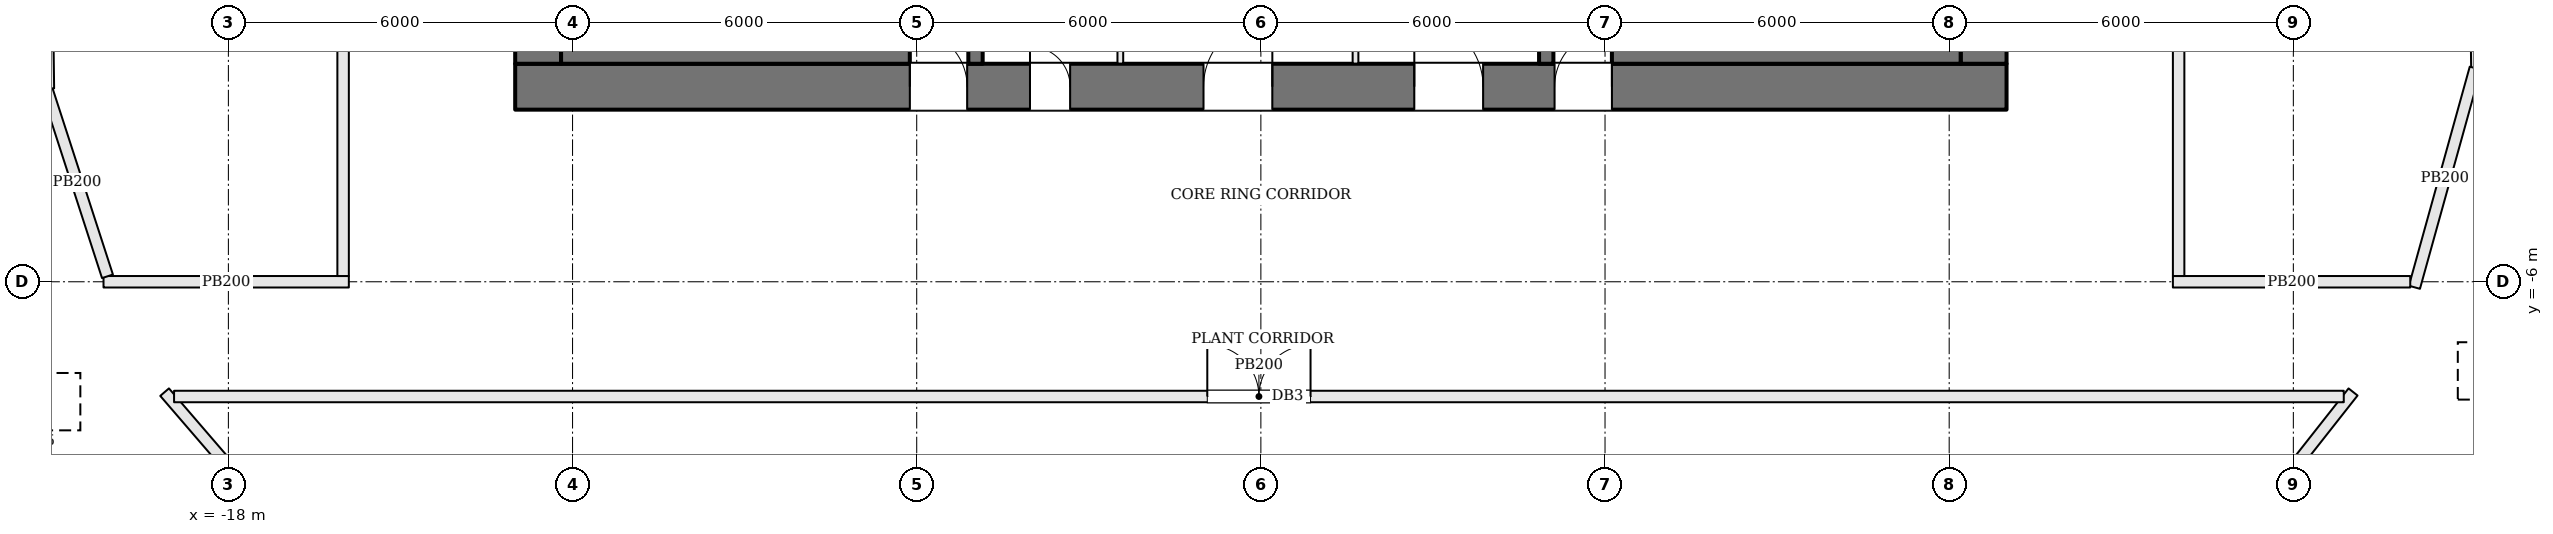
"""IFC4 building model, lengths in metres.
Left out: names, types, materials, properties, quantities, classifications, styles, units other than length and angle.
Written with IfcOpenShell. Run it as: python <this file> out.ifc"""

import sys

from ifc_helpers import new_model, si_unit, direction, frame, frame_2d, origin, origin_2d, place, context, subcontext, project, spatial, rectangle, extrude, element, fill, save


model = new_model("IFC4")
c1 = context("Model", 3, precision=1e-05, world=origin(), true_north=direction((0.0, 1.0)))
c2 = subcontext(c1, "Body", "Model", "MODEL_VIEW")
j1 = project(units=[si_unit("LENGTHUNIT", "METRE"), si_unit("PLANEANGLEUNIT", "RADIAN")], contexts=[c1])
p1 = place(None, origin())
s1 = spatial("IfcSite", under=j1, at=p1, CompositionType="ELEMENT")
p2 = place(p1, origin())
s2 = spatial("IfcBuilding", under=s1, at=p2, CompositionType="ELEMENT")
p3 = place(p2, frame((0.0, 0.0, 264.3)))
s3 = spatial("IfcBuildingStorey", under=s2, at=p3, CompositionType="ELEMENT", Elevation=264.3)
p4 = place(p3, frame((-13.0, -2.6, 0.0), z_axis=(0.0, 0.0, 1.0), x_axis=(1.0, 0.0, 0.0)))
e1 = element("IfcWall", 1, at=p4, inside=s3, PredefinedType="SHEAR", context=c2, shape_type="SweptSolid", body=[
    extrude(rectangle(XDim=26.0, YDim=0.8, at=frame_2d((13.0, 0.0))), origin(), (0.0, 0.0, 1.0), 4.5),
])
p5 = place(p4, frame((8.975, 0.0, 0.0)))
e2 = element("IfcOpeningElement", 2, at=p5, cuts=e1, PredefinedType="OPENING", context=c2, shape_type="SweptSolid", body=[
    extrude(rectangle(XDim=0.7, YDim=2.1, at=frame_2d((0.35, 1.05))), frame((0.0, 0.41, 0.0), z_axis=(0.0, -1.0, 0.0), x_axis=(1.0, 0.0, 0.0)), (0.0, 0.0, 1.0), 0.82),
])
p6 = place(p4, frame((12.0, 0.0, 0.0)))
e3 = element("IfcOpeningElement", 3, at=p6, cuts=e1, PredefinedType="OPENING", context=c2, shape_type="SweptSolid", body=[
    extrude(rectangle(XDim=1.2, YDim=2.1, at=frame_2d((0.6, 1.05))), frame((0.0, 0.41, 0.0), z_axis=(0.0, -1.0, 0.0), x_axis=(1.0, 0.0, 0.0)), (0.0, 0.0, 1.0), 0.82),
])
p7 = place(p4, frame((15.675, 0.0, 0.0)))
e4 = element("IfcOpeningElement", 4, at=p7, cuts=e1, PredefinedType="OPENING", context=c2, shape_type="SweptSolid", body=[
    extrude(rectangle(XDim=1.2, YDim=2.1, at=frame_2d((0.6, 1.05))), frame((0.0, 0.41, 0.0), z_axis=(0.0, -1.0, 0.0), x_axis=(1.0, 0.0, 0.0)), (0.0, 0.0, 1.0), 0.82),
])
p8 = place(p4, frame((6.88, 0.0, 0.0)))
e5 = element("IfcOpeningElement", 5, at=p8, cuts=e1, PredefinedType="OPENING", context=c2, shape_type="SweptSolid", body=[
    extrude(rectangle(XDim=1.0, YDim=2.1, at=frame_2d((0.5, 1.05))), frame((0.0, 0.41, 0.0), z_axis=(0.0, -1.0, 0.0), x_axis=(1.0, 0.0, 0.0)), (0.0, 0.0, 1.0), 0.82),
])
p9 = place(p4, frame((18.12, 0.0, 0.0)))
e6 = element("IfcOpeningElement", 6, at=p9, cuts=e1, PredefinedType="OPENING", context=c2, shape_type="SweptSolid", body=[
    extrude(rectangle(XDim=1.0, YDim=2.1, at=frame_2d((0.5, 1.05))), frame((0.0, 0.41, 0.0), z_axis=(0.0, -1.0, 0.0), x_axis=(1.0, 0.0, 0.0)), (0.0, 0.0, 1.0), 0.82),
])
p10 = place(p3, frame((12.6, -2.2, 0.0), z_axis=(0.0, 0.0, 1.0), x_axis=(0.0, 1.0, 0.0)))
e7 = element("IfcWall", 7, at=p10, inside=s3, PredefinedType="SHEAR", context=c2, shape_type="SweptSolid", body=[
    extrude(rectangle(XDim=13.4, YDim=0.8, at=frame_2d((6.7, 0.0))), origin(), (0.0, 0.0, 1.0), 4.5),
])
p11 = place(p10, frame((7.4, 0.0, 0.0)))
e8 = element("IfcOpeningElement", 8, at=p11, cuts=e7, PredefinedType="OPENING", context=c2, shape_type="SweptSolid", body=[
    extrude(rectangle(XDim=1.8, YDim=2.1, at=frame_2d((0.9, 1.05))), frame((0.0, 0.41, 0.0), z_axis=(0.0, -1.0, 0.0), x_axis=(1.0, 0.0, 0.0)), (0.0, 0.0, 1.0), 0.82),
])
p12 = place(p3, frame((-12.6, -2.2, 0.0), z_axis=(0.0, 0.0, 1.0), x_axis=(0.0, 1.0, 0.0)))
e9 = element("IfcWall", 9, at=p12, inside=s3, PredefinedType="SHEAR", context=c2, shape_type="SweptSolid", body=[
    extrude(rectangle(XDim=13.4, YDim=0.8, at=frame_2d((6.7, 0.0))), origin(), (0.0, 0.0, 1.0), 4.5),
])
p13 = place(p12, frame((4.2, 0.0, 0.0)))
e10 = element("IfcOpeningElement", 10, at=p13, cuts=e9, PredefinedType="OPENING", context=c2, shape_type="SweptSolid", body=[
    extrude(rectangle(XDim=1.8, YDim=2.1, at=frame_2d((0.9, 1.05))), frame((0.0, 0.41, 0.0), z_axis=(0.0, -1.0, 0.0), x_axis=(1.0, 0.0, 0.0)), (0.0, 0.0, 1.0), 0.82),
])
p14 = place(p3, frame((-22.879, -8.787, -0.585), z_axis=(0.391333642687, 0.151718841645, 0.907655977335), x_axis=(-0.361480683506, 0.932379598367, 0.0)))
e11 = element("IfcColumn", 11, at=p14, inside=s3, PredefinedType="COLUMN", context=c2, shape_type="SweptSolid", body=[
    extrude(rectangle(XDim=1.0, YDim=1.0, at=origin_2d()), origin(), (0.0, 0.0, 1.0), 4.594),
])
p15 = place(p3, frame((23.185, -8.21, -0.585), z_axis=(-0.395577824141, 0.142730980726, 0.907273967547), x_axis=(-0.339399243932, -0.940642415171, 0.0)))
e12 = element("IfcColumn", 12, at=p15, inside=s3, PredefinedType="COLUMN", context=c2, shape_type="SweptSolid", body=[
    extrude(rectangle(XDim=1.0, YDim=1.0, at=origin_2d()), origin(), (0.0, 0.0, 1.0), 4.596),
])
p16 = place(p3, frame((-4.975, -2.2, 0.0), z_axis=(0.0, 0.0, 1.0), x_axis=(0.0, 1.0, 0.0)))
e13 = element("IfcWall", 13, at=p16, inside=s3, PredefinedType="SOLIDWALL", context=c2, shape_type="SweptSolid", body=[
    extrude(rectangle(XDim=13.4, YDim=0.25, at=frame_2d((6.7, 0.0))), origin(), (0.0, 0.0, 1.0), 4.3),
])
p17 = place(p16, frame((5.25, 0.0, 0.0)))
e14 = element("IfcOpeningElement", 14, at=p17, cuts=e13, PredefinedType="OPENING", context=c2, shape_type="SweptSolid", body=[
    extrude(rectangle(XDim=1.2, YDim=2.1, at=frame_2d((0.6, 1.05))), frame((0.0, 0.135, 0.0), z_axis=(0.0, -1.0, 0.0), x_axis=(1.0, 0.0, 0.0)), (0.0, 0.0, 1.0), 0.27),
])
p18 = place(p3, frame((4.975, 11.2, 0.0), z_axis=(0.0, 0.0, 1.0), x_axis=(0.0, -1.0, 0.0)))
e15 = element("IfcWall", 15, at=p18, inside=s3, PredefinedType="SOLIDWALL", context=c2, shape_type="SweptSolid", body=[
    extrude(rectangle(XDim=13.4, YDim=0.25, at=frame_2d((6.7, 0.0))), origin(), (0.0, 0.0, 1.0), 4.3),
])
p19 = place(p18, frame((5.25, 0.0, 0.0)))
e16 = element("IfcOpeningElement", 16, at=p19, cuts=e15, PredefinedType="OPENING", context=c2, shape_type="SweptSolid", body=[
    extrude(rectangle(XDim=1.2, YDim=2.1, at=frame_2d((0.6, 1.05))), frame((0.0, 0.135, 0.0), z_axis=(0.0, -1.0, 0.0), x_axis=(1.0, 0.0, 0.0)), (0.0, 0.0, 1.0), 0.27),
])
for number, where, z_axis, x_axis in (
    (17, (-12.2, -1.9, 0.0), (0.0, 0.0, 1.0), (1.0, 0.0, 0.0)),
    (18, (12.2, -1.9, 0.0), (0.0, 0.0, 1.0), (-1.0, 0.0, 0.0)),
):
    element("IfcWall", number, at=place(p3, frame(where, z_axis=z_axis, x_axis=x_axis)), inside=s3, PredefinedType="SOLIDWALL", context=c2, shape_type="SweptSolid", body=[
        extrude(rectangle(XDim=6.08, YDim=0.6, at=frame_2d((3.04, 0.0))), origin(), (0.0, 0.0, 1.0), 4.3),
    ])
for number, where, z_axis, x_axis in (
    (19, (-2.45, -2.2, 0.0), (0.0, 0.0, 1.0), (0.0, 1.0, 0.0)),
    (20, (1.65, -2.2, 0.0), (0.0, 0.0, 1.0), (0.0, 1.0, 0.0)),
):
    element("IfcWall", number, at=place(p3, frame(where, z_axis=z_axis, x_axis=x_axis)), inside=s3, PredefinedType="PARTITIONING", context=c2, shape_type="SweptSolid", body=[
        extrude(rectangle(XDim=2.6, YDim=0.1, at=frame_2d((1.3, 0.0))), origin(), (0.0, 0.0, 1.0), 4.3),
    ])
p20 = place(p3, frame((19.041, -7.921, 0.0), z_axis=(0.0, 0.0, 1.0), x_axis=(-0.618817980567, -0.785534408493, 0.0)))
e21 = element("IfcWall", 21, at=p20, inside=s3, PredefinedType="PARTITIONING", context=c2, shape_type="SweptSolid", body=[
    extrude(rectangle(XDim=3.45, YDim=0.2, at=frame_2d((1.725, 0.0))), origin(), (0.0, 0.0, 1.0), 4.3),
])
p21 = place(p3, frame((-16.614, -10.824, 0.0), z_axis=(0.0, 0.0, 1.0), x_axis=(-0.652659458067, 0.757651391998, 0.0)))
e22 = element("IfcWall", 22, at=p21, inside=s3, PredefinedType="PARTITIONING", context=c2, shape_type="SweptSolid", body=[
    extrude(rectangle(XDim=3.827, YDim=0.2, at=frame_2d((1.914, 0.0))), origin(), (0.0, 0.0, 1.0), 4.3),
])
p22 = place(p3, frame((-18.947, -8.0, 0.0), z_axis=(0.0, 0.0, 1.0), x_axis=(1.0, 0.0, 0.0)))
e23 = element("IfcWall", 23, at=p22, inside=s3, PredefinedType="PARTITIONING", context=c2, shape_type="SweptSolid", body=[
    extrude(rectangle(XDim=37.826, YDim=0.2, at=frame_2d((18.913, 0.0))), origin(), (0.0, 0.0, 1.0), 4.3),
])
p23 = place(p22, frame((18.013, 0.0, 0.0)))
e24 = element("IfcOpeningElement", 24, at=p23, cuts=e23, PredefinedType="OPENING", context=c2, shape_type="SweptSolid", body=[
    extrude(rectangle(XDim=1.8, YDim=2.1, at=frame_2d((0.9, 1.05))), frame((0.0, 0.11, 0.0), z_axis=(0.0, -1.0, 0.0), x_axis=(1.0, 0.0, 0.0)), (0.0, 0.0, 1.0), 0.22),
])
p24 = place(p3, frame((-15.9, -6.0, 0.0), z_axis=(0.0, 0.0, 1.0), x_axis=(-1.0, 0.0, 0.0)))
e25 = element("IfcWall", 25, at=p24, inside=s3, PredefinedType="PARTITIONING", context=c2, shape_type="SweptSolid", body=[
    extrude(rectangle(XDim=4.277, YDim=0.2, at=frame_2d((2.139, 0.0))), origin(), (0.0, 0.0, 1.0), 4.3),
])
p25 = place(p3, frame((-20.108, -5.905, 0.0), z_axis=(0.0, 0.0, 1.0), x_axis=(-0.308376170844, 0.951264493848, 0.0)))
e26 = element("IfcWall", 26, at=p25, inside=s3, PredefinedType="PARTITIONING", context=c2, shape_type="SweptSolid", body=[
    extrude(rectangle(XDim=3.438, YDim=0.2, at=frame_2d((1.719, 0.0))), origin(), (0.0, 0.0, 1.0), 4.3),
])
p26 = place(p3, frame((-21.138, -2.63, 0.0), z_axis=(0.0, 0.0, 1.0), x_axis=(-0.012626385888, 0.999920284012, 0.0)))
e27 = element("IfcWall", 27, at=p26, inside=s3, PredefinedType="PARTITIONING", context=c2, shape_type="SweptSolid", body=[
    extrude(rectangle(XDim=4.911, YDim=0.2, at=frame_2d((2.456, 0.0))), origin(), (0.0, 0.0, 1.0), 4.3),
])
p27 = place(p3, frame((-16.0, 11.053, 0.0), z_axis=(0.0, 0.0, 1.0), x_axis=(0.0, -1.0, 0.0)))
e28 = element("IfcWall", 28, at=p27, inside=s3, PredefinedType="PARTITIONING", context=c2, shape_type="SweptSolid", body=[
    extrude(rectangle(XDim=16.953, YDim=0.2, at=frame_2d((8.477, 0.0))), origin(), (0.0, 0.0, 1.0), 4.3),
])
p28 = place(p27, frame((6.077, 0.0, 0.0)))
e29 = element("IfcOpeningElement", 29, at=p28, cuts=e28, PredefinedType="OPENING", context=c2, shape_type="SweptSolid", body=[
    extrude(rectangle(XDim=1.8, YDim=2.1, at=frame_2d((0.9, 1.05))), frame((0.0, 0.11, 0.0), z_axis=(0.0, -1.0, 0.0), x_axis=(1.0, 0.0, 0.0)), (0.0, 0.0, 1.0), 0.22),
])
p29 = place(p3, frame((21.138, 2.63, 0.0), z_axis=(0.0, 0.0, 1.0), x_axis=(0.012626385888, -0.999920284012, 0.0)))
e30 = element("IfcWall", 30, at=p29, inside=s3, PredefinedType="PARTITIONING", context=c2, shape_type="SweptSolid", body=[
    extrude(rectangle(XDim=4.911, YDim=0.2, at=frame_2d((2.456, 0.0))), origin(), (0.0, 0.0, 1.0), 4.3),
])
p30 = place(p3, frame((21.172, -2.277, 0.0), z_axis=(0.0, 0.0, 1.0), x_axis=(-0.267701048026, -0.963502023291, 0.0)))
e31 = element("IfcWall", 31, at=p30, inside=s3, PredefinedType="PARTITIONING", context=c2, shape_type="SweptSolid", body=[
    extrude(rectangle(XDim=3.964, YDim=0.2, at=frame_2d((1.982, 0.0))), origin(), (0.0, 0.0, 1.0), 4.3),
])
p31 = place(p3, frame((20.038, -6.0, 0.0), z_axis=(0.0, 0.0, 1.0), x_axis=(-1.0, 0.0, 0.0)))
e32 = element("IfcWall", 32, at=p31, inside=s3, PredefinedType="PARTITIONING", context=c2, shape_type="SweptSolid", body=[
    extrude(rectangle(XDim=4.138, YDim=0.2, at=frame_2d((2.069, 0.0))), origin(), (0.0, 0.0, 1.0), 4.3),
])
p32 = place(p3, frame((16.0, -5.9, 0.0), z_axis=(0.0, 0.0, 1.0), x_axis=(0.0, 1.0, 0.0)))
e33 = element("IfcWall", 33, at=p32, inside=s3, PredefinedType="PARTITIONING", context=c2, shape_type="SweptSolid", body=[
    extrude(rectangle(XDim=17.017, YDim=0.2, at=frame_2d((8.508, 0.0))), origin(), (0.0, 0.0, 1.0), 4.3),
])
p33 = place(p32, frame((9.108, 0.0, 0.0)))
e34 = element("IfcOpeningElement", 34, at=p33, cuts=e33, PredefinedType="OPENING", context=c2, shape_type="SweptSolid", body=[
    extrude(rectangle(XDim=1.8, YDim=2.1, at=frame_2d((0.9, 1.05))), frame((0.0, 0.11, 0.0), z_axis=(0.0, -1.0, 0.0), x_axis=(1.0, 0.0, 0.0)), (0.0, 0.0, 1.0), 0.22),
])
p34 = place(p5, origin())
e35 = element("IfcDoor", 35, at=p34, inside=s3, OperationType="SINGLE_SWING_LEFT", PredefinedType="DOOR", context=c2, shape_type="SweptSolid", body=[
    extrude(rectangle(XDim=0.7, YDim=2.1, at=frame_2d((0.35, 1.05))), frame((0.0, 0.025, 0.0), z_axis=(0.0, -1.0, 0.0), x_axis=(1.0, 0.0, 0.0)), (0.0, 0.0, 1.0), 0.05),
])
fill(e2, e35)
p35 = place(p6, origin())
e36 = element("IfcDoor", 36, at=p35, inside=s3, OperationType="SINGLE_SWING_RIGHT", PredefinedType="DOOR", context=c2, shape_type="SweptSolid", body=[
    extrude(rectangle(XDim=1.2, YDim=2.1, at=frame_2d((0.6, 1.05))), frame((0.0, 0.025, 0.0), z_axis=(0.0, -1.0, 0.0), x_axis=(1.0, 0.0, 0.0)), (0.0, 0.0, 1.0), 0.05),
])
fill(e3, e36)
p36 = place(p7, origin())
e37 = element("IfcDoor", 37, at=p36, inside=s3, OperationType="SINGLE_SWING_LEFT", PredefinedType="DOOR", context=c2, shape_type="SweptSolid", body=[
    extrude(rectangle(XDim=1.2, YDim=2.1, at=frame_2d((0.6, 1.05))), frame((0.0, 0.025, 0.0), z_axis=(0.0, -1.0, 0.0), x_axis=(1.0, 0.0, 0.0)), (0.0, 0.0, 1.0), 0.05),
])
fill(e4, e37)
p37 = place(p8, origin())
e38 = element("IfcDoor", 38, at=p37, inside=s3, OperationType="SINGLE_SWING_LEFT", PredefinedType="DOOR", context=c2, shape_type="SweptSolid", body=[
    extrude(rectangle(XDim=1.0, YDim=2.1, at=frame_2d((0.5, 1.05))), frame((0.0, 0.025, 0.0), z_axis=(0.0, -1.0, 0.0), x_axis=(1.0, 0.0, 0.0)), (0.0, 0.0, 1.0), 0.05),
])
fill(e5, e38)
p38 = place(p9, origin())
e39 = element("IfcDoor", 39, at=p38, inside=s3, OperationType="SINGLE_SWING_RIGHT", PredefinedType="DOOR", context=c2, shape_type="SweptSolid", body=[
    extrude(rectangle(XDim=1.0, YDim=2.1, at=frame_2d((0.5, 1.05))), frame((0.0, 0.025, 0.0), z_axis=(0.0, -1.0, 0.0), x_axis=(1.0, 0.0, 0.0)), (0.0, 0.0, 1.0), 0.05),
])
fill(e6, e39)
p39 = place(p23, origin())
e40 = element("IfcDoor", 40, at=p39, inside=s3, OperationType="DOUBLE_DOOR_SINGLE_SWING", PredefinedType="DOOR", context=c2, shape_type="SweptSolid", body=[
    extrude(rectangle(XDim=1.8, YDim=2.1, at=frame_2d((0.9, 1.05))), frame((0.0, 0.025, 0.0), z_axis=(0.0, -1.0, 0.0), x_axis=(1.0, 0.0, 0.0)), (0.0, 0.0, 1.0), 0.05),
])
fill(e24, e40)
save(model, sys.argv[1])
